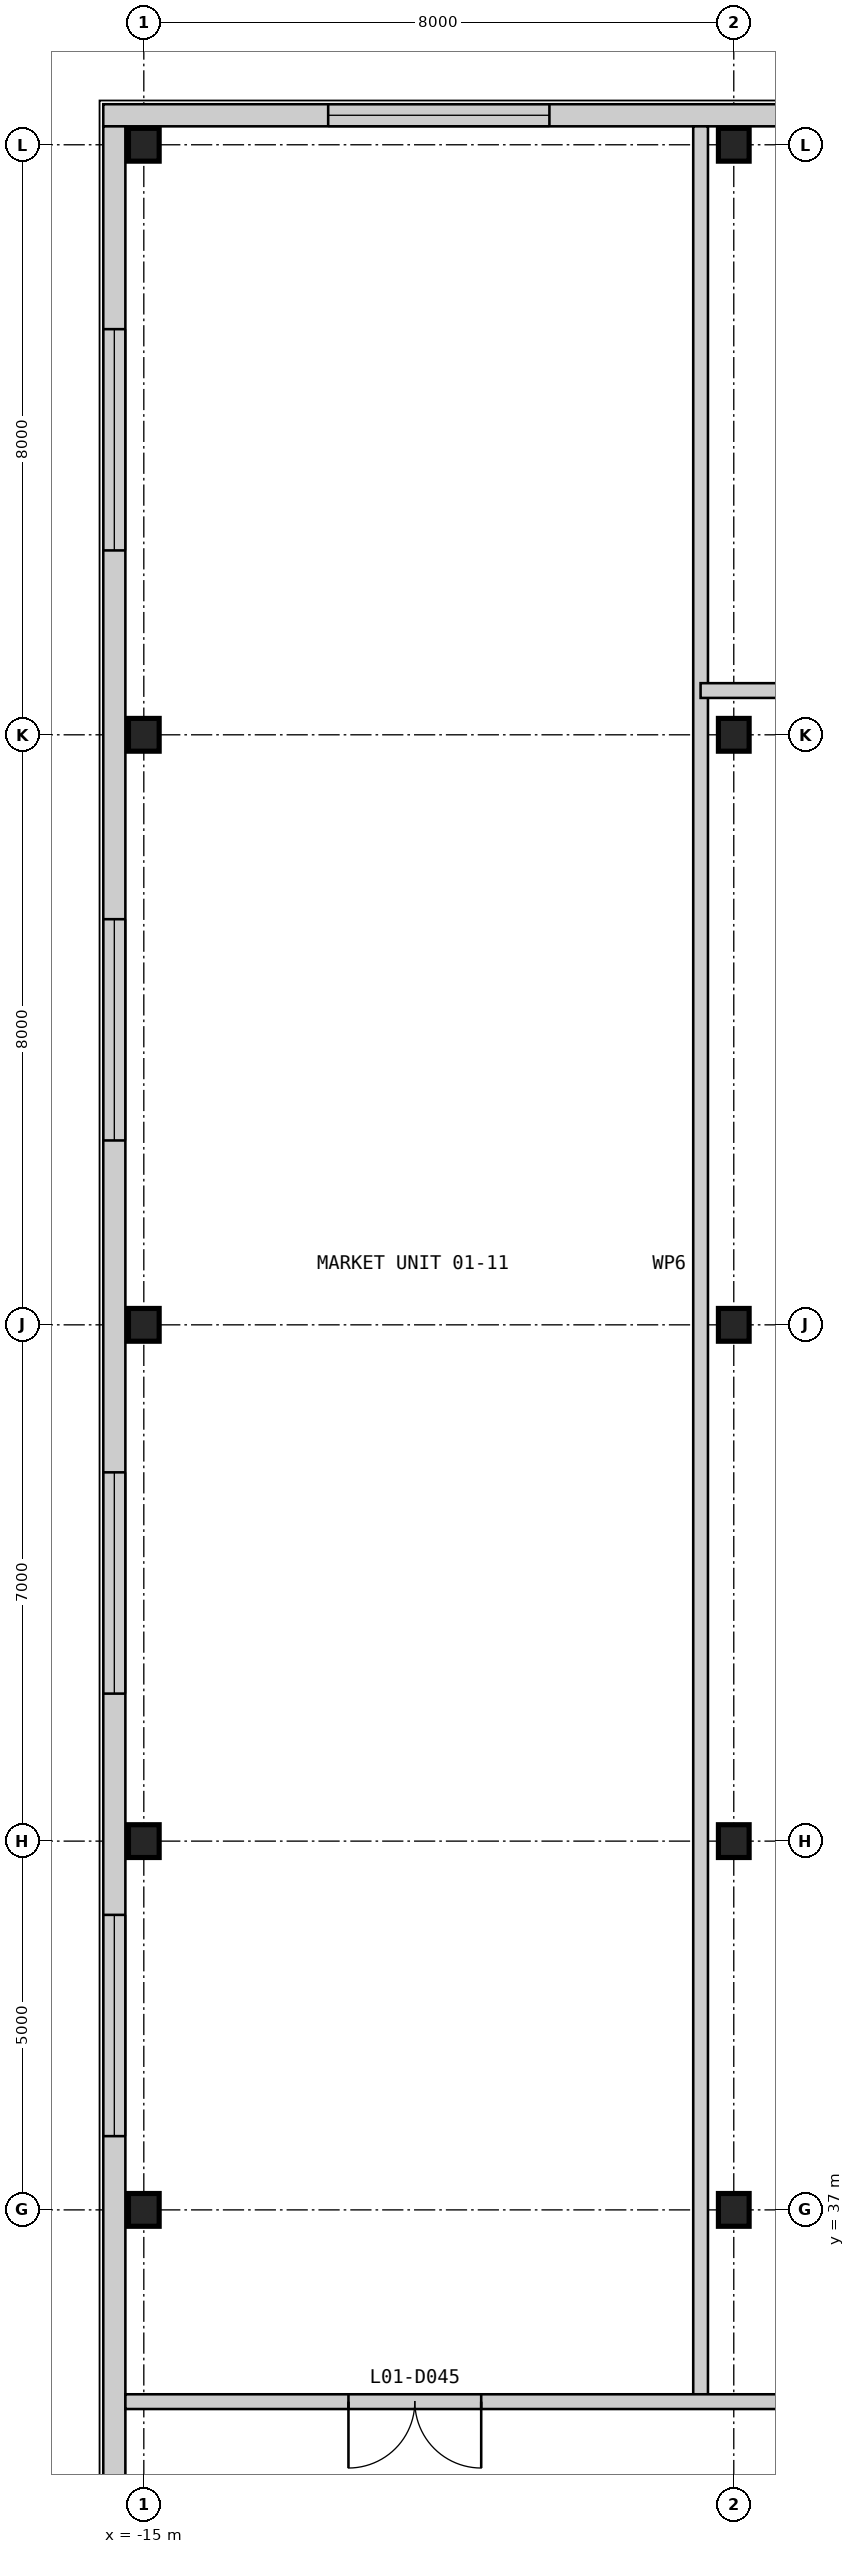
"""IFC4 building model, lengths in metres.
Left out: names, types, materials, properties, quantities, classifications, styles, units other than length and angle.
Written with IfcOpenShell. Run it as: python <this file> out.ifc"""

import sys

from ifc_helpers import new_model, si_unit, direction, frame, frame_2d, origin, origin_2d, place, context, subcontext, project, spatial, rectangle, i_section, extrude, element, fill, save


model = new_model("IFC4")
c1 = context("Model", 3, precision=1e-05, world=origin(), true_north=direction((0.0, 1.0)))
c2 = subcontext(c1, "Body", "Model", "MODEL_VIEW")
j1 = project(units=[si_unit("LENGTHUNIT", "METRE"), si_unit("PLANEANGLEUNIT", "RADIAN")], contexts=[c1])
p1 = place(None, origin())
s1 = spatial("IfcSite", under=j1, at=p1, CompositionType="ELEMENT")
p2 = place(p1, origin())
s2 = spatial("IfcBuilding", under=s1, at=p2, CompositionType="ELEMENT")
p3 = place(p2, frame((0.0, 0.0, 7.0)))
s3 = spatial("IfcBuildingStorey", under=s2, at=p3, CompositionType="ELEMENT", Elevation=7.0)
for number, where, z_axis, x_axis in (
    (1, (-15.0, 37.0, 0.0), (0.0, 0.0, 1.0), (1.0, 0.0, 0.0)),
    (2, (-15.0, 42.0, 0.0), (0.0, 0.0, 1.0), (1.0, 0.0, 0.0)),
    (3, (-15.0, 49.0, 0.0), (0.0, 0.0, 1.0), (1.0, 0.0, 0.0)),
    (4, (-15.0, 57.0, 0.0), (0.0, 0.0, 1.0), (1.0, 0.0, 0.0)),
    (5, (-15.0, 65.0, 0.0), (0.0, 0.0, 1.0), (1.0, 0.0, 0.0)),
    (6, (-7.0, 37.0, 0.0), (0.0, 0.0, 1.0), (1.0, 0.0, 0.0)),
    (7, (-7.0, 42.0, 0.0), (0.0, 0.0, 1.0), (1.0, 0.0, 0.0)),
    (8, (-7.0, 49.0, 0.0), (0.0, 0.0, 1.0), (1.0, 0.0, 0.0)),
    (9, (-7.0, 57.0, 0.0), (0.0, 0.0, 1.0), (1.0, 0.0, 0.0)),
    (10, (-7.0, 65.0, 0.0), (0.0, 0.0, 1.0), (1.0, 0.0, 0.0)),
):
    element("IfcColumn", number, at=place(p3, frame(where, z_axis=z_axis, x_axis=x_axis)), inside=s3, PredefinedType="COLUMN", context=c2, shape_type="SweptSolid", body=[
        extrude(i_section(OverallWidth=0.417, OverallDepth=0.445, WebThickness=0.039, FlangeThickness=0.063, at=origin_2d()), origin(), (0.0, 0.0, 1.0), 4.8),
    ])
p4 = place(p3, frame((65.55, 65.4, 0.0), z_axis=(0.0, 0.0, 1.0), x_axis=(-1.0, 0.0, 0.0)))
e11 = element("IfcWall", 11, at=p4, inside=s3, PredefinedType="SOLIDWALL", context=c2, shape_type="SweptSolid", body=[
    extrude(rectangle(XDim=81.1, YDim=0.3, at=frame_2d((40.55, 0.0))), origin(), (0.0, 0.0, 1.0), 4.5),
])
p5 = place(p4, frame((75.05, 0.0, 0.9)))
e12 = element("IfcOpeningElement", 12, at=p5, cuts=e11, PredefinedType="OPENING", context=c2, shape_type="SweptSolid", body=[
    extrude(rectangle(XDim=3.0, YDim=2.4, at=frame_2d((1.5, 1.2))), frame((0.0, 0.16, 0.0), z_axis=(0.0, -1.0, 0.0), x_axis=(1.0, 0.0, 0.0)), (0.0, 0.0, 1.0), 0.32),
])
p6 = place(p4, frame((67.05, 0.0, 0.9)))
e13 = element("IfcOpeningElement", 13, at=p6, cuts=e11, PredefinedType="OPENING", context=c2, shape_type="SweptSolid", body=[
    extrude(rectangle(XDim=3.0, YDim=2.4, at=frame_2d((1.5, 1.2))), frame((0.0, 0.16, 0.0), z_axis=(0.0, -1.0, 0.0), x_axis=(1.0, 0.0, 0.0)), (0.0, 0.0, 1.0), 0.32),
])
p7 = place(p4, frame((59.05, 0.0, 0.9)))
e14 = element("IfcOpeningElement", 14, at=p7, cuts=e11, PredefinedType="OPENING", context=c2, shape_type="SweptSolid", body=[
    extrude(rectangle(XDim=3.0, YDim=2.4, at=frame_2d((1.5, 1.2))), frame((0.0, 0.16, 0.0), z_axis=(0.0, -1.0, 0.0), x_axis=(1.0, 0.0, 0.0)), (0.0, 0.0, 1.0), 0.32),
])
p8 = place(p4, frame((45.05, 0.0, 0.9)))
e15 = element("IfcOpeningElement", 15, at=p8, cuts=e11, PredefinedType="OPENING", context=c2, shape_type="SweptSolid", body=[
    extrude(rectangle(XDim=3.0, YDim=2.4, at=frame_2d((1.5, 1.2))), frame((0.0, 0.16, 0.0), z_axis=(0.0, -1.0, 0.0), x_axis=(1.0, 0.0, 0.0)), (0.0, 0.0, 1.0), 0.32),
])
p9 = place(p4, frame((33.05, 0.0, 0.9)))
e16 = element("IfcOpeningElement", 16, at=p9, cuts=e11, PredefinedType="OPENING", context=c2, shape_type="SweptSolid", body=[
    extrude(rectangle(XDim=3.0, YDim=2.4, at=frame_2d((1.5, 1.2))), frame((0.0, 0.16, 0.0), z_axis=(0.0, -1.0, 0.0), x_axis=(1.0, 0.0, 0.0)), (0.0, 0.0, 1.0), 0.32),
])
p10 = place(p4, frame((24.55, 0.0, 0.9)))
e17 = element("IfcOpeningElement", 17, at=p10, cuts=e11, PredefinedType="OPENING", context=c2, shape_type="SweptSolid", body=[
    extrude(rectangle(XDim=3.0, YDim=2.4, at=frame_2d((1.5, 1.2))), frame((0.0, 0.16, 0.0), z_axis=(0.0, -1.0, 0.0), x_axis=(1.0, 0.0, 0.0)), (0.0, 0.0, 1.0), 0.32),
])
p11 = place(p4, frame((18.55, 0.0, 0.9)))
e18 = element("IfcOpeningElement", 18, at=p11, cuts=e11, PredefinedType="OPENING", context=c2, shape_type="SweptSolid", body=[
    extrude(rectangle(XDim=3.0, YDim=2.4, at=frame_2d((1.5, 1.2))), frame((0.0, 0.16, 0.0), z_axis=(0.0, -1.0, 0.0), x_axis=(1.0, 0.0, 0.0)), (0.0, 0.0, 1.0), 0.32),
])
p12 = place(p4, frame((11.05, 0.0, 0.9)))
e19 = element("IfcOpeningElement", 19, at=p12, cuts=e11, PredefinedType="OPENING", context=c2, shape_type="SweptSolid", body=[
    extrude(rectangle(XDim=3.0, YDim=2.4, at=frame_2d((1.5, 1.2))), frame((0.0, 0.16, 0.0), z_axis=(0.0, -1.0, 0.0), x_axis=(1.0, 0.0, 0.0)), (0.0, 0.0, 1.0), 0.32),
])
p13 = place(p4, frame((3.05, 0.0, 0.9)))
e20 = element("IfcOpeningElement", 20, at=p13, cuts=e11, PredefinedType="OPENING", context=c2, shape_type="SweptSolid", body=[
    extrude(rectangle(XDim=3.0, YDim=2.4, at=frame_2d((1.5, 1.2))), frame((0.0, 0.16, 0.0), z_axis=(0.0, -1.0, 0.0), x_axis=(1.0, 0.0, 0.0)), (0.0, 0.0, 1.0), 0.32),
])
p14 = place(p3, frame((-15.4, 65.25, 0.0), z_axis=(0.0, 0.0, 1.0), x_axis=(0.0, -1.0, 0.0)))
e21 = element("IfcWall", 21, at=p14, inside=s3, PredefinedType="SOLIDWALL", context=c2, shape_type="SweptSolid", body=[
    extrude(rectangle(XDim=80.5, YDim=0.3, at=frame_2d((40.25, 0.0))), origin(), (0.0, 0.0, 1.0), 4.5),
])
p15 = place(p14, frame((74.75, 0.0, 0.9)))
e22 = element("IfcOpeningElement", 22, at=p15, cuts=e21, PredefinedType="OPENING", context=c2, shape_type="SweptSolid", body=[
    extrude(rectangle(XDim=3.0, YDim=2.4, at=frame_2d((1.5, 1.2))), frame((0.0, 0.16, 0.0), z_axis=(0.0, -1.0, 0.0), x_axis=(1.0, 0.0, 0.0)), (0.0, 0.0, 1.0), 0.32),
])
p16 = place(p14, frame((66.75, 0.0, 0.9)))
e23 = element("IfcOpeningElement", 23, at=p16, cuts=e21, PredefinedType="OPENING", context=c2, shape_type="SweptSolid", body=[
    extrude(rectangle(XDim=3.0, YDim=2.4, at=frame_2d((1.5, 1.2))), frame((0.0, 0.16, 0.0), z_axis=(0.0, -1.0, 0.0), x_axis=(1.0, 0.0, 0.0)), (0.0, 0.0, 1.0), 0.32),
])
p17 = place(p14, frame((58.75, 0.0, 0.9)))
e24 = element("IfcOpeningElement", 24, at=p17, cuts=e21, PredefinedType="OPENING", context=c2, shape_type="SweptSolid", body=[
    extrude(rectangle(XDim=3.0, YDim=2.4, at=frame_2d((1.5, 1.2))), frame((0.0, 0.16, 0.0), z_axis=(0.0, -1.0, 0.0), x_axis=(1.0, 0.0, 0.0)), (0.0, 0.0, 1.0), 0.32),
])
p18 = place(p14, frame((44.75, 0.0, 0.9)))
e25 = element("IfcOpeningElement", 25, at=p18, cuts=e21, PredefinedType="OPENING", context=c2, shape_type="SweptSolid", body=[
    extrude(rectangle(XDim=3.0, YDim=2.4, at=frame_2d((1.5, 1.2))), frame((0.0, 0.16, 0.0), z_axis=(0.0, -1.0, 0.0), x_axis=(1.0, 0.0, 0.0)), (0.0, 0.0, 1.0), 0.32),
])
p19 = place(p14, frame((32.75, 0.0, 0.9)))
e26 = element("IfcOpeningElement", 26, at=p19, cuts=e21, PredefinedType="OPENING", context=c2, shape_type="SweptSolid", body=[
    extrude(rectangle(XDim=3.0, YDim=2.4, at=frame_2d((1.5, 1.2))), frame((0.0, 0.16, 0.0), z_axis=(0.0, -1.0, 0.0), x_axis=(1.0, 0.0, 0.0)), (0.0, 0.0, 1.0), 0.32),
])
p20 = place(p14, frame((24.25, 0.0, 0.9)))
e27 = element("IfcOpeningElement", 27, at=p20, cuts=e21, PredefinedType="OPENING", context=c2, shape_type="SweptSolid", body=[
    extrude(rectangle(XDim=3.0, YDim=2.4, at=frame_2d((1.5, 1.2))), frame((0.0, 0.16, 0.0), z_axis=(0.0, -1.0, 0.0), x_axis=(1.0, 0.0, 0.0)), (0.0, 0.0, 1.0), 0.32),
])
p21 = place(p14, frame((18.25, 0.0, 0.9)))
e28 = element("IfcOpeningElement", 28, at=p21, cuts=e21, PredefinedType="OPENING", context=c2, shape_type="SweptSolid", body=[
    extrude(rectangle(XDim=3.0, YDim=2.4, at=frame_2d((1.5, 1.2))), frame((0.0, 0.16, 0.0), z_axis=(0.0, -1.0, 0.0), x_axis=(1.0, 0.0, 0.0)), (0.0, 0.0, 1.0), 0.32),
])
p22 = place(p14, frame((10.75, 0.0, 0.9)))
e29 = element("IfcOpeningElement", 29, at=p22, cuts=e21, PredefinedType="OPENING", context=c2, shape_type="SweptSolid", body=[
    extrude(rectangle(XDim=3.0, YDim=2.4, at=frame_2d((1.5, 1.2))), frame((0.0, 0.16, 0.0), z_axis=(0.0, -1.0, 0.0), x_axis=(1.0, 0.0, 0.0)), (0.0, 0.0, 1.0), 0.32),
])
p23 = place(p14, frame((2.75, 0.0, 0.9)))
e30 = element("IfcOpeningElement", 30, at=p23, cuts=e21, PredefinedType="OPENING", context=c2, shape_type="SweptSolid", body=[
    extrude(rectangle(XDim=3.0, YDim=2.4, at=frame_2d((1.5, 1.2))), frame((0.0, 0.16, 0.0), z_axis=(0.0, -1.0, 0.0), x_axis=(1.0, 0.0, 0.0)), (0.0, 0.0, 1.0), 0.32),
])
p24 = place(p3, frame((-7.45, 34.4, 0.0), z_axis=(0.0, 0.0, 1.0), x_axis=(0.0, 1.0, 0.0)))
e31 = element("IfcWall", 31, at=p24, inside=s3, PredefinedType="PARTITIONING", context=c2, shape_type="SweptSolid", body=[
    extrude(rectangle(XDim=30.85, YDim=0.2, at=frame_2d((15.425, 0.0))), origin(), (0.0, 0.0, 1.0), 4.5),
])
p25 = place(p3, frame((-15.25, 34.4, 0.0), z_axis=(0.0, 0.0, 1.0), x_axis=(1.0, 0.0, 0.0)))
e32 = element("IfcWall", 32, at=p25, inside=s3, PredefinedType="PARTITIONING", context=c2, shape_type="SweptSolid", body=[
    extrude(rectangle(XDim=22.25, YDim=0.2, at=frame_2d((11.125, 0.0))), origin(), (0.0, 0.0, 1.0), 4.5),
])
p26 = place(p25, frame((17.525, 0.0, 0.0)))
e33 = element("IfcOpeningElement", 33, at=p26, cuts=e32, PredefinedType="OPENING", context=c2, shape_type="SweptSolid", body=[
    extrude(rectangle(XDim=1.8, YDim=2.4, at=frame_2d((0.9, 1.2))), frame((0.0, 0.11, 0.0), z_axis=(0.0, -1.0, 0.0), x_axis=(1.0, 0.0, 0.0)), (0.0, 0.0, 1.0), 0.22),
])
p27 = place(p25, frame((10.325, 0.0, 0.0)))
e34 = element("IfcOpeningElement", 34, at=p27, cuts=e32, PredefinedType="OPENING", context=c2, shape_type="SweptSolid", body=[
    extrude(rectangle(XDim=1.8, YDim=2.4, at=frame_2d((0.9, 1.2))), frame((0.0, 0.11, 0.0), z_axis=(0.0, -1.0, 0.0), x_axis=(1.0, 0.0, 0.0)), (0.0, 0.0, 1.0), 0.22),
])
p28 = place(p25, frame((3.025, 0.0, 0.0)))
e35 = element("IfcOpeningElement", 35, at=p28, cuts=e32, PredefinedType="OPENING", context=c2, shape_type="SweptSolid", body=[
    extrude(rectangle(XDim=1.8, YDim=2.4, at=frame_2d((0.9, 1.2))), frame((0.0, 0.11, 0.0), z_axis=(0.0, -1.0, 0.0), x_axis=(1.0, 0.0, 0.0)), (0.0, 0.0, 1.0), 0.22),
])
p29 = place(p3, frame((-7.45, 57.6, 0.0), z_axis=(0.0, 0.0, 1.0), x_axis=(1.0, 0.0, 0.0)))
e36 = element("IfcWall", 36, at=p29, inside=s3, PredefinedType="PARTITIONING", context=c2, shape_type="SweptSolid", body=[
    extrude(rectangle(XDim=19.05, YDim=0.2, at=frame_2d((9.525, 0.0))), origin(), (0.0, 0.0, 1.0), 4.5),
])
p30 = place(p5, origin())
e37 = element("IfcWindow", 37, at=p30, inside=s3, PartitioningType="SINGLE_PANEL", PredefinedType="WINDOW", context=c2, shape_type="SweptSolid", body=[
    extrude(rectangle(XDim=3.0, YDim=2.4, at=frame_2d((1.5, 1.2))), frame((0.0, 0.03, 0.0), z_axis=(0.0, -1.0, 0.0), x_axis=(1.0, 0.0, 0.0)), (0.0, 0.0, 1.0), 0.06),
])
fill(e12, e37)
p31 = place(p20, origin())
e38 = element("IfcWindow", 38, at=p31, inside=s3, PartitioningType="SINGLE_PANEL", PredefinedType="WINDOW", context=c2, shape_type="SweptSolid", body=[
    extrude(rectangle(XDim=3.0, YDim=2.4, at=frame_2d((1.5, 1.2))), frame((0.0, 0.03, 0.0), z_axis=(0.0, -1.0, 0.0), x_axis=(1.0, 0.0, 0.0)), (0.0, 0.0, 1.0), 0.06),
])
fill(e27, e38)
p32 = place(p21, origin())
e39 = element("IfcWindow", 39, at=p32, inside=s3, PartitioningType="SINGLE_PANEL", PredefinedType="WINDOW", context=c2, shape_type="SweptSolid", body=[
    extrude(rectangle(XDim=3.0, YDim=2.4, at=frame_2d((1.5, 1.2))), frame((0.0, 0.03, 0.0), z_axis=(0.0, -1.0, 0.0), x_axis=(1.0, 0.0, 0.0)), (0.0, 0.0, 1.0), 0.06),
])
fill(e28, e39)
p33 = place(p22, origin())
e40 = element("IfcWindow", 40, at=p33, inside=s3, PartitioningType="SINGLE_PANEL", PredefinedType="WINDOW", context=c2, shape_type="SweptSolid", body=[
    extrude(rectangle(XDim=3.0, YDim=2.4, at=frame_2d((1.5, 1.2))), frame((0.0, 0.03, 0.0), z_axis=(0.0, -1.0, 0.0), x_axis=(1.0, 0.0, 0.0)), (0.0, 0.0, 1.0), 0.06),
])
fill(e29, e40)
p34 = place(p23, origin())
e41 = element("IfcWindow", 41, at=p34, inside=s3, PartitioningType="SINGLE_PANEL", PredefinedType="WINDOW", context=c2, shape_type="SweptSolid", body=[
    extrude(rectangle(XDim=3.0, YDim=2.4, at=frame_2d((1.5, 1.2))), frame((0.0, 0.03, 0.0), z_axis=(0.0, -1.0, 0.0), x_axis=(1.0, 0.0, 0.0)), (0.0, 0.0, 1.0), 0.06),
])
fill(e30, e41)
p35 = place(p28, frame((1.8, 0.0, 0.0), z_axis=(0.0, 0.0, 1.0), x_axis=(-1.0, 0.0, 0.0)))
e42 = element("IfcDoor", 42, at=p35, inside=s3, OperationType="DOUBLE_DOOR_SINGLE_SWING", PredefinedType="DOOR", context=c2, shape_type="SweptSolid", body=[
    extrude(rectangle(XDim=1.8, YDim=2.4, at=frame_2d((0.9, 1.2))), frame((0.0, 0.025, 0.0), z_axis=(0.0, -1.0, 0.0), x_axis=(1.0, 0.0, 0.0)), (0.0, 0.0, 1.0), 0.05),
])
fill(e35, e42)
save(model, sys.argv[1])
